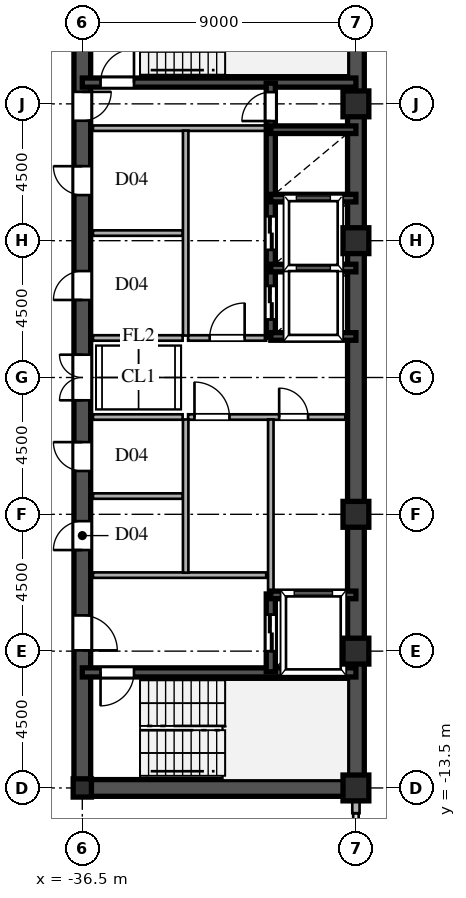
"""IFC4 building model, lengths in metres.
Left out: names, types, materials, properties, quantities, classifications, styles, units other than length and angle.
Written with IfcOpenShell. Run it as: python <this file> out.ifc"""

import sys

from ifc_helpers import new_model, si_unit, direction, frame, frame_2d, origin, origin_2d, place, context, subcontext, project, spatial, rectangle, hollow_rectangle, i_section, extrude, source, transform, mapped, element, fill, save


model = new_model("IFC4")
c1 = context("Model", 3, precision=1e-05, world=origin(), true_north=direction((0.0, 1.0)))
c2 = subcontext(c1, "Body", "Model", "MODEL_VIEW")
j1 = project(units=[si_unit("LENGTHUNIT", "METRE"), si_unit("PLANEANGLEUNIT", "RADIAN")], contexts=[c1])
p1 = place(None, origin())
s1 = spatial("IfcSite", under=j1, at=p1, CompositionType="ELEMENT")
p2 = place(p1, origin())
s2 = spatial("IfcBuilding", under=s1, at=p2, CompositionType="ELEMENT")
p3 = place(p2, frame((0.0, 0.0, 192.3)))
s3 = spatial("IfcBuildingStorey", under=s2, at=p3, CompositionType="ELEMENT", Elevation=192.3)
m1 = source(origin(), c2, "Body", "SweptSolid", [
    extrude(hollow_rectangle(XDim=0.85, YDim=0.85, WallThickness=0.036, at=origin_2d()), origin(), (0.0, 0.0, 1.0), 3.6),
])
for number, where, z_axis, x_axis in (
    (1, (-27.5, -13.5, 0.0), (0.0, 0.0, 1.0), (1.0, 0.0, 0.0)),
    (2, (-27.5, -9.0, 0.0), (0.0, 0.0, 1.0), (1.0, 0.0, 0.0)),
    (3, (-27.5, -4.5, 0.0), (0.0, 0.0, 1.0), (1.0, 0.0, 0.0)),
    (4, (-27.5, 4.5, 0.0), (0.0, 0.0, 1.0), (1.0, 0.0, 0.0)),
    (5, (-27.5, 9.0, 0.0), (0.0, 0.0, 1.0), (1.0, 0.0, 0.0)),
):
    element("IfcColumn", number, at=place(p3, frame(where, z_axis=z_axis, x_axis=x_axis)), inside=s3, PredefinedType="COLUMN", context=c2, shape_type="MappedRepresentation", body=[
        mapped(m1, transform((0.0, 0.0, 0.0), scale=1.0)),
    ])
m2 = source(origin(), c2, "Body", "SweptSolid", [
    extrude(i_section(OverallWidth=0.6, OverallDepth=0.6, WebThickness=0.025, FlangeThickness=0.04, at=origin_2d()), origin(), (0.0, 0.0, 1.0), 3.6),
])
p4 = place(p3, frame((-36.5, -13.5, 0.0), z_axis=(0.0, 0.0, 1.0), x_axis=(1.0, 0.0, 0.0)))
e6 = element("IfcColumn", 6, at=p4, inside=s3, PredefinedType="COLUMN", context=c2, shape_type="MappedRepresentation", body=[
    mapped(m2, transform((0.0, 0.0, 0.0), scale=1.0)),
])
p5 = place(p3, frame((-27.5, -14.33, 0.0), z_axis=(0.0, 0.0, 1.0), x_axis=(0.0, 1.0, 0.0)))
e7 = element("IfcWall", 7, at=p5, inside=s3, PredefinedType="SOLIDWALL", context=c2, shape_type="SweptSolid", body=[
    extrude(rectangle(XDim=0.55, YDim=0.24, at=frame_2d((0.275, 0.0))), origin(), (0.0, 0.0, 1.0), 1.88),
])
for number, where, z_axis, x_axis in (
    (8, (-27.5, -13.5, 0.0), (0.0, 0.0, 1.0), (0.0, 1.0, 0.0)),
    (9, (-27.5, 1.3, 0.0), (0.0, 0.0, 1.0), (0.0, 1.0, 0.0)),
):
    element("IfcWall", number, at=place(p3, frame(where, z_axis=z_axis, x_axis=x_axis)), inside=s3, PredefinedType="SHEAR", context=c2, shape_type="SweptSolid", body=[
        extrude(rectangle(XDim=12.2, YDim=0.55, at=frame_2d((6.1, 0.0))), origin(), (0.0, 0.0, 1.0), 3.38),
    ])
p6 = place(p3, frame((-27.5, -1.3, 0.0), z_axis=(0.0, 0.0, 1.0), x_axis=(0.0, 1.0, 0.0)))
e10 = element("IfcWall", 10, at=p6, inside=s3, PredefinedType="SHEAR", context=c2, shape_type="SweptSolid", body=[
    extrude(rectangle(XDim=2.6, YDim=0.55, at=frame_2d((1.3, 0.0))), origin(), (0.0, 0.0, 1.0), 3.38),
])
p7 = place(p3, frame((-36.5, -13.5, 0.0), z_axis=(0.0, 0.0, 1.0), x_axis=(1.0, 0.0, 0.0)))
e11 = element("IfcWall", 11, at=p7, inside=s3, PredefinedType="SHEAR", context=c2, shape_type="SweptSolid", body=[
    extrude(rectangle(XDim=9.0, YDim=0.55, at=frame_2d((4.5, 0.0))), origin(), (0.0, 0.0, 1.0), 3.38),
])
p8 = place(p3, frame((-36.5, -13.65, 0.0), z_axis=(0.0, 0.0, 1.0), x_axis=(0.0, 1.0, 0.0)))
e12 = element("IfcWall", 12, at=p8, inside=s3, PredefinedType="SHEAR", context=c2, shape_type="SweptSolid", body=[
    extrude(rectangle(XDim=7.15, YDim=0.55, at=frame_2d((3.575, 0.0))), origin(), (0.0, 0.0, 1.0), 3.38),
])
p9 = place(p8, frame((4.675, 0.0, 0.0)))
e13 = element("IfcOpeningElement", 13, at=p9, cuts=e12, PredefinedType="OPENING", context=c2, shape_type="SweptSolid", body=[
    extrude(rectangle(XDim=1.15, YDim=2.2, at=frame_2d((0.575, 1.1))), frame((0.0, 0.285, 0.0), z_axis=(0.0, -1.0, 0.0), x_axis=(1.0, 0.0, 0.0)), (0.0, 0.0, 1.0), 0.57),
])
p10 = place(p3, frame((-36.5, -1.3, 0.0), z_axis=(0.0, 0.0, 1.0), x_axis=(0.0, 1.0, 0.0)))
e14 = element("IfcWall", 14, at=p10, inside=s3, PredefinedType="SHEAR", context=c2, shape_type="SweptSolid", body=[
    extrude(rectangle(XDim=2.6, YDim=0.55, at=frame_2d((1.3, 0.0))), origin(), (0.0, 0.0, 1.0), 3.38),
])
p11 = place(p10, frame((0.55, 0.0, 0.0)))
e15 = element("IfcOpeningElement", 15, at=p11, cuts=e14, PredefinedType="OPENING", context=c2, shape_type="SweptSolid", body=[
    extrude(rectangle(XDim=1.5, YDim=2.3, at=frame_2d((0.75, 1.15))), frame((0.0, 0.285, 0.0), z_axis=(0.0, -1.0, 0.0), x_axis=(1.0, 0.0, 0.0)), (0.0, 0.0, 1.0), 0.57),
])
p12 = place(p3, frame((-36.5, 8.2, 0.0), z_axis=(0.0, 0.0, 1.0), x_axis=(0.0, 1.0, 0.0)))
e16 = element("IfcWall", 16, at=p12, inside=s3, PredefinedType="SHEAR", context=c2, shape_type="SweptSolid", body=[
    extrude(rectangle(XDim=5.45, YDim=0.55, at=frame_2d((2.725, 0.0))), origin(), (0.0, 0.0, 1.0), 3.38),
])
p13 = place(p12, frame((0.245, 0.0, 0.0)))
e17 = element("IfcOpeningElement", 17, at=p13, cuts=e16, PredefinedType="OPENING", context=c2, shape_type="SweptSolid", body=[
    extrude(rectangle(XDim=0.95, YDim=2.15, at=frame_2d((0.475, 1.075))), frame((0.0, 0.285, 0.0), z_axis=(0.0, -1.0, 0.0), x_axis=(1.0, 0.0, 0.0)), (0.0, 0.0, 1.0), 0.57),
])
p14 = place(p3, frame((-36.5, -6.5, 0.0), z_axis=(0.0, 0.0, 1.0), x_axis=(0.0, 1.0, 0.0)))
e18 = element("IfcWall", 18, at=p14, inside=s3, PredefinedType="SHEAR", context=c2, shape_type="SweptSolid", body=[
    extrude(rectangle(XDim=2.6, YDim=0.55, at=frame_2d((1.3, 0.0))), origin(), (0.0, 0.0, 1.0), 3.38),
])
p15 = place(p14, frame((0.825, 0.0, 0.0)))
e19 = element("IfcOpeningElement", 19, at=p15, cuts=e18, PredefinedType="OPENING", context=c2, shape_type="SweptSolid", body=[
    extrude(rectangle(XDim=0.95, YDim=2.15, at=frame_2d((0.475, 1.075))), frame((0.0, 0.285, 0.0), z_axis=(0.0, -1.0, 0.0), x_axis=(1.0, 0.0, 0.0)), (0.0, 0.0, 1.0), 0.57),
])
p16 = place(p3, frame((-36.5, -3.9, 0.0), z_axis=(0.0, 0.0, 1.0), x_axis=(0.0, 1.0, 0.0)))
e20 = element("IfcWall", 20, at=p16, inside=s3, PredefinedType="SHEAR", context=c2, shape_type="SweptSolid", body=[
    extrude(rectangle(XDim=2.6, YDim=0.55, at=frame_2d((1.3, 0.0))), origin(), (0.0, 0.0, 1.0), 3.38),
])
p17 = place(p16, frame((0.825, 0.0, 0.0)))
e21 = element("IfcOpeningElement", 21, at=p17, cuts=e20, PredefinedType="OPENING", context=c2, shape_type="SweptSolid", body=[
    extrude(rectangle(XDim=0.95, YDim=2.15, at=frame_2d((0.475, 1.075))), frame((0.0, 0.285, 0.0), z_axis=(0.0, -1.0, 0.0), x_axis=(1.0, 0.0, 0.0)), (0.0, 0.0, 1.0), 0.57),
])
p18 = place(p3, frame((-36.5, 1.3, 0.0), z_axis=(0.0, 0.0, 1.0), x_axis=(0.0, 1.0, 0.0)))
e22 = element("IfcWall", 22, at=p18, inside=s3, PredefinedType="SHEAR", context=c2, shape_type="SweptSolid", body=[
    extrude(rectangle(XDim=3.45, YDim=0.55, at=frame_2d((1.725, 0.0))), origin(), (0.0, 0.0, 1.0), 3.38),
])
p19 = place(p18, frame((1.25, 0.0, 0.0)))
e23 = element("IfcOpeningElement", 23, at=p19, cuts=e22, PredefinedType="OPENING", context=c2, shape_type="SweptSolid", body=[
    extrude(rectangle(XDim=0.95, YDim=2.15, at=frame_2d((0.475, 1.075))), frame((0.0, 0.285, 0.0), z_axis=(0.0, -1.0, 0.0), x_axis=(1.0, 0.0, 0.0)), (0.0, 0.0, 1.0), 0.57),
])
p20 = place(p3, frame((-36.5, 4.75, 0.0), z_axis=(0.0, 0.0, 1.0), x_axis=(0.0, 1.0, 0.0)))
e24 = element("IfcWall", 24, at=p20, inside=s3, PredefinedType="SHEAR", context=c2, shape_type="SweptSolid", body=[
    extrude(rectangle(XDim=3.45, YDim=0.55, at=frame_2d((1.725, 0.0))), origin(), (0.0, 0.0, 1.0), 3.38),
])
p21 = place(p20, frame((1.25, 0.0, 0.0)))
e25 = element("IfcOpeningElement", 25, at=p21, cuts=e24, PredefinedType="OPENING", context=c2, shape_type="SweptSolid", body=[
    extrude(rectangle(XDim=0.95, YDim=2.15, at=frame_2d((0.475, 1.075))), frame((0.0, 0.285, 0.0), z_axis=(0.0, -1.0, 0.0), x_axis=(1.0, 0.0, 0.0)), (0.0, 0.0, 1.0), 0.57),
])
p22 = place(p3, frame((-36.5, -9.7, 0.0), z_axis=(0.0, 0.0, 1.0), x_axis=(1.0, 0.0, 0.0)))
e26 = element("IfcWall", 26, at=p22, inside=s3, PredefinedType="SHEAR", context=c2, shape_type="SweptSolid", body=[
    extrude(rectangle(XDim=9.0, YDim=0.3, at=frame_2d((4.5, 0.0))), origin(), (0.0, 0.0, 1.0), 3.38),
])
p23 = place(p22, frame((0.6, 0.0, 0.0)))
e27 = element("IfcOpeningElement", 27, at=p23, cuts=e26, PredefinedType="OPENING", context=c2, shape_type="SweptSolid", body=[
    extrude(rectangle(XDim=1.1, YDim=2.2, at=frame_2d((0.55, 1.1))), frame((0.0, 0.16, 0.0), z_axis=(0.0, -1.0, 0.0), x_axis=(1.0, 0.0, 0.0)), (0.0, 0.0, 1.0), 0.32),
])
p24 = place(p3, frame((-36.5, 9.7, 0.0), z_axis=(0.0, 0.0, 1.0), x_axis=(1.0, 0.0, 0.0)))
e28 = element("IfcWall", 28, at=p24, inside=s3, PredefinedType="SHEAR", context=c2, shape_type="SweptSolid", body=[
    extrude(rectangle(XDim=9.0, YDim=0.3, at=frame_2d((4.5, 0.0))), origin(), (0.0, 0.0, 1.0), 3.38),
])
p25 = place(p24, frame((0.6, 0.0, 0.0)))
e29 = element("IfcOpeningElement", 29, at=p25, cuts=e28, PredefinedType="OPENING", context=c2, shape_type="SweptSolid", body=[
    extrude(rectangle(XDim=1.1, YDim=2.2, at=frame_2d((0.55, 1.1))), frame((0.0, 0.16, 0.0), z_axis=(0.0, -1.0, 0.0), x_axis=(1.0, 0.0, 0.0)), (0.0, 0.0, 1.0), 0.32),
])
for number, where, z_axis, x_axis in (
    (30, (-30.3, -7.15, 0.0), (0.0, 0.0, 1.0), (1.0, 0.0, 0.0)),
    (31, (-30.3, 1.35, 0.0), (0.0, 0.0, 1.0), (1.0, 0.0, 0.0)),
    (32, (-30.3, 3.6, 0.0), (0.0, 0.0, 1.0), (1.0, 0.0, 0.0)),
    (33, (-30.3, 5.9, 0.0), (0.0, 0.0, 1.0), (1.0, 0.0, 0.0)),
    (34, (-30.3, 8.15, 0.0), (0.0, 0.0, 1.0), (1.0, 0.0, 0.0)),
):
    element("IfcWall", number, at=place(p3, frame(where, z_axis=z_axis, x_axis=x_axis)), inside=s3, PredefinedType="SHEAR", context=c2, shape_type="SweptSolid", body=[
        extrude(rectangle(XDim=2.8, YDim=0.25, at=frame_2d((1.4, 0.0))), origin(), (0.0, 0.0, 1.0), 3.38),
    ])
p26 = place(p3, frame((-30.3, -9.68, 0.0), z_axis=(0.0, 0.0, 1.0), x_axis=(0.0, 1.0, 0.0)))
e35 = element("IfcWall", 35, at=p26, inside=s3, PredefinedType="SHEAR", context=c2, shape_type="SweptSolid", body=[
    extrude(rectangle(XDim=2.56, YDim=0.3, at=frame_2d((1.28, 0.0))), origin(), (0.0, 0.0, 1.0), 3.38),
])
p27 = place(p26, frame((0.68, 0.0, 0.0)))
e36 = element("IfcOpeningElement", 36, at=p27, cuts=e35, PredefinedType="OPENING", context=c2, shape_type="SweptSolid", body=[
    extrude(rectangle(XDim=1.2, YDim=2.25, at=frame_2d((0.6, 1.125))), frame((0.0, 0.16, 0.0), z_axis=(0.0, -1.0, 0.0), x_axis=(1.0, 0.0, 0.0)), (0.0, 0.0, 1.0), 0.32),
])
p28 = place(p3, frame((-30.3, 1.32, 0.0), z_axis=(0.0, 0.0, 1.0), x_axis=(0.0, 1.0, 0.0)))
e37 = element("IfcWall", 37, at=p28, inside=s3, PredefinedType="SHEAR", context=c2, shape_type="SweptSolid", body=[
    extrude(rectangle(XDim=2.28, YDim=0.3, at=frame_2d((1.14, 0.0))), origin(), (0.0, 0.0, 1.0), 3.38),
])
p29 = place(p28, frame((0.59, 0.0, 0.0)))
e38 = element("IfcOpeningElement", 38, at=p29, cuts=e37, PredefinedType="OPENING", context=c2, shape_type="SweptSolid", body=[
    extrude(rectangle(XDim=1.1, YDim=2.2, at=frame_2d((0.55, 1.1))), frame((0.0, 0.16, 0.0), z_axis=(0.0, -1.0, 0.0), x_axis=(1.0, 0.0, 0.0)), (0.0, 0.0, 1.0), 0.32),
])
p30 = place(p3, frame((-30.3, 3.6, 0.0), z_axis=(0.0, 0.0, 1.0), x_axis=(0.0, 1.0, 0.0)))
e39 = element("IfcWall", 39, at=p30, inside=s3, PredefinedType="SHEAR", context=c2, shape_type="SweptSolid", body=[
    extrude(rectangle(XDim=2.3, YDim=0.3, at=frame_2d((1.15, 0.0))), origin(), (0.0, 0.0, 1.0), 3.38),
])
p31 = place(p30, frame((0.6, 0.0, 0.0)))
e40 = element("IfcOpeningElement", 40, at=p31, cuts=e39, PredefinedType="OPENING", context=c2, shape_type="SweptSolid", body=[
    extrude(rectangle(XDim=1.1, YDim=2.2, at=frame_2d((0.55, 1.1))), frame((0.0, 0.16, 0.0), z_axis=(0.0, -1.0, 0.0), x_axis=(1.0, 0.0, 0.0)), (0.0, 0.0, 1.0), 0.32),
])
p32 = place(p3, frame((-30.3, 5.9, 0.0), z_axis=(0.0, 0.0, 1.0), x_axis=(0.0, 1.0, 0.0)))
e41 = element("IfcWall", 41, at=p32, inside=s3, PredefinedType="SHEAR", context=c2, shape_type="SweptSolid", body=[
    extrude(rectangle(XDim=2.25, YDim=0.3, at=frame_2d((1.125, 0.0))), origin(), (0.0, 0.0, 1.0), 3.38),
])
p33 = place(p3, frame((-30.3, 8.15, 0.0), z_axis=(0.0, 0.0, 1.0), x_axis=(0.0, 1.0, 0.0)))
e42 = element("IfcWall", 42, at=p33, inside=s3, PredefinedType="SHEAR", context=c2, shape_type="SweptSolid", body=[
    extrude(rectangle(XDim=1.53, YDim=0.3, at=frame_2d((0.765, 0.0))), origin(), (0.0, 0.0, 1.0), 3.38),
])
p34 = place(p33, frame((0.285, 0.0, 0.0)))
e43 = element("IfcOpeningElement", 43, at=p34, cuts=e42, PredefinedType="OPENING", context=c2, shape_type="SweptSolid", body=[
    extrude(rectangle(XDim=0.95, YDim=2.15, at=frame_2d((0.475, 1.075))), frame((0.0, 0.16, 0.0), z_axis=(0.0, -1.0, 0.0), x_axis=(1.0, 0.0, 0.0)), (0.0, 0.0, 1.0), 0.32),
])
for number, where, z_axis, x_axis in (
    (44, (-36.15, -6.5, 0.0), (0.0, 0.0, 1.0), (1.0, 0.0, 0.0)),
    (45, (-36.15, 8.2, 0.0), (0.0, 0.0, 1.0), (1.0, 0.0, 0.0)),
):
    element("IfcWall", number, at=place(p3, frame(where, z_axis=z_axis, x_axis=x_axis)), inside=s3, PredefinedType="PARTITIONING", context=c2, shape_type="SweptSolid", body=[
        extrude(rectangle(XDim=5.7, YDim=0.18, at=frame_2d((2.85, 0.0))), origin(), (0.0, 0.0, 1.0), 3.38),
    ])
p35 = place(p3, frame((-33.1, -6.42, 0.0), z_axis=(0.0, 0.0, 1.0), x_axis=(0.0, 1.0, 0.0)))
e46 = element("IfcWall", 46, at=p35, inside=s3, PredefinedType="PARTITIONING", context=c2, shape_type="SweptSolid", body=[
    extrude(rectangle(XDim=5.04, YDim=0.18, at=frame_2d((2.52, 0.0))), origin(), (0.0, 0.0, 1.0), 3.38),
])
p36 = place(p3, frame((-33.1, 1.38, 0.0), z_axis=(0.0, 0.0, 1.0), x_axis=(0.0, 1.0, 0.0)))
e47 = element("IfcWall", 47, at=p36, inside=s3, PredefinedType="PARTITIONING", context=c2, shape_type="SweptSolid", body=[
    extrude(rectangle(XDim=6.74, YDim=0.18, at=frame_2d((3.37, 0.0))), origin(), (0.0, 0.0, 1.0), 3.38),
])
p37 = place(p3, frame((-30.3, -1.3, 0.0), z_axis=(0.0, 0.0, 1.0), x_axis=(1.0, 0.0, 0.0)))
e48 = element("IfcWall", 48, at=p37, inside=s3, PredefinedType="PARTITIONING", context=c2, shape_type="SweptSolid", body=[
    extrude(rectangle(XDim=2.45, YDim=0.18, at=frame_2d((1.225, 0.0))), origin(), (0.0, 0.0, 1.0), 3.38),
])
p38 = place(p37, frame((0.275, 0.0, 0.0)))
e49 = element("IfcOpeningElement", 49, at=p38, cuts=e48, PredefinedType="OPENING", context=c2, shape_type="SweptSolid", body=[
    extrude(rectangle(XDim=0.95, YDim=2.15, at=frame_2d((0.475, 1.075))), frame((0.0, 0.1, 0.0), z_axis=(0.0, -1.0, 0.0), x_axis=(1.0, 0.0, 0.0)), (0.0, 0.0, 1.0), 0.2),
])
p39 = place(p3, frame((-33.02, -1.3, 0.0), z_axis=(0.0, 0.0, 1.0), x_axis=(1.0, 0.0, 0.0)))
e50 = element("IfcWall", 50, at=p39, inside=s3, PredefinedType="PARTITIONING", context=c2, shape_type="SweptSolid", body=[
    extrude(rectangle(XDim=2.72, YDim=0.18, at=frame_2d((1.36, 0.0))), origin(), (0.0, 0.0, 1.0), 3.38),
])
p40 = place(p39, frame((0.21, 0.0, 0.0)))
e51 = element("IfcOpeningElement", 51, at=p40, cuts=e50, PredefinedType="OPENING", context=c2, shape_type="SweptSolid", body=[
    extrude(rectangle(XDim=1.15, YDim=2.2, at=frame_2d((0.575, 1.1))), frame((0.0, 0.1, 0.0), z_axis=(0.0, -1.0, 0.0), x_axis=(1.0, 0.0, 0.0)), (0.0, 0.0, 1.0), 0.2),
])
p41 = place(p3, frame((-30.3, -7.12, 0.0), z_axis=(0.0, 0.0, 1.0), x_axis=(0.0, 1.0, 0.0)))
e52 = element("IfcWall", 52, at=p41, inside=s3, PredefinedType="PARTITIONING", context=c2, shape_type="SweptSolid", body=[
    extrude(rectangle(XDim=5.74, YDim=0.18, at=frame_2d((2.87, 0.0))), origin(), (0.0, 0.0, 1.0), 3.38),
])
p42 = place(p3, frame((-33.02, 1.3, 0.0), z_axis=(0.0, 0.0, 1.0), x_axis=(1.0, 0.0, 0.0)))
e53 = element("IfcWall", 53, at=p42, inside=s3, PredefinedType="PARTITIONING", context=c2, shape_type="SweptSolid", body=[
    extrude(rectangle(XDim=2.57, YDim=0.18, at=frame_2d((1.285, 0.0))), origin(), (0.0, 0.0, 1.0), 3.38),
])
p43 = place(p42, frame((0.71, 0.0, 0.0)))
e54 = element("IfcOpeningElement", 54, at=p43, cuts=e53, PredefinedType="OPENING", context=c2, shape_type="SweptSolid", body=[
    extrude(rectangle(XDim=1.15, YDim=2.2, at=frame_2d((0.575, 1.1))), frame((0.0, 0.1, 0.0), z_axis=(0.0, -1.0, 0.0), x_axis=(1.0, 0.0, 0.0)), (0.0, 0.0, 1.0), 0.2),
])
for number, where, z_axis, x_axis in (
    (55, (-36.15, -1.3, 0.0), (0.0, 0.0, 1.0), (1.0, 0.0, 0.0)),
    (56, (-36.15, 1.3, 0.0), (0.0, 0.0, 1.0), (1.0, 0.0, 0.0)),
    (57, (-36.15, -3.9, 0.0), (0.0, 0.0, 1.0), (1.0, 0.0, 0.0)),
    (58, (-36.15, 4.75, 0.0), (0.0, 0.0, 1.0), (1.0, 0.0, 0.0)),
):
    element("IfcWall", number, at=place(p3, frame(where, z_axis=z_axis, x_axis=x_axis)), inside=s3, PredefinedType="PARTITIONING", context=c2, shape_type="SweptSolid", body=[
        extrude(rectangle(XDim=2.95, YDim=0.18, at=frame_2d((1.475, 0.0))), origin(), (0.0, 0.0, 1.0), 3.38),
    ])
m3 = source(origin(), c2, "Body", "SweptSolid", [
    extrude(rectangle(XDim=1.15, YDim=2.2, at=frame_2d((0.575, 1.1))), frame((0.0, 0.025, 0.0), z_axis=(0.0, -1.0, 0.0), x_axis=(1.0, 0.0, 0.0)), (0.0, 0.0, 1.0), 0.05),
])
p44 = place(p9, frame((1.15, 0.0, 0.0), z_axis=(0.0, 0.0, 1.0), x_axis=(-1.0, 0.0, 0.0)))
e59 = element("IfcDoor", 59, at=p44, inside=s3, OperationType="SINGLE_SWING_LEFT", PredefinedType="DOOR", context=c2, shape_type="MappedRepresentation", body=[
    mapped(m3, transform((0.0, 0.0, 0.0), scale=1.0)),
])
fill(e13, e59)
m4 = source(origin(), c2, "Body", "SweptSolid", [
    extrude(rectangle(XDim=1.5, YDim=2.3, at=frame_2d((0.75, 1.15))), frame((0.0, 0.025, 0.0), z_axis=(0.0, -1.0, 0.0), x_axis=(1.0, 0.0, 0.0)), (0.0, 0.0, 1.0), 0.05),
])
p45 = place(p11, origin())
e60 = element("IfcDoor", 60, at=p45, inside=s3, OperationType="DOUBLE_SWING_LEFT", PredefinedType="DOOR", context=c2, shape_type="MappedRepresentation", body=[
    mapped(m4, transform((0.0, 0.0, 0.0), scale=1.0)),
])
fill(e15, e60)
m5 = source(origin(), c2, "Body", "SweptSolid", [
    extrude(rectangle(XDim=0.95, YDim=2.15, at=frame_2d((0.475, 1.075))), frame((0.0, 0.025, 0.0), z_axis=(0.0, -1.0, 0.0), x_axis=(1.0, 0.0, 0.0)), (0.0, 0.0, 1.0), 0.05),
])
p46 = place(p13, frame((0.95, 0.0, 0.0), z_axis=(0.0, 0.0, 1.0), x_axis=(-1.0, 0.0, 0.0)))
e61 = element("IfcDoor", 61, at=p46, inside=s3, OperationType="SINGLE_SWING_RIGHT", PredefinedType="DOOR", context=c2, shape_type="MappedRepresentation", body=[
    mapped(m5, transform((0.0, 0.0, 0.0), scale=1.0)),
])
fill(e17, e61)
p47 = place(p15, origin())
e62 = element("IfcDoor", 62, at=p47, inside=s3, OperationType="SINGLE_SWING_LEFT", PredefinedType="DOOR", context=c2, shape_type="MappedRepresentation", body=[
    mapped(m5, transform((0.0, 0.0, 0.0), scale=1.0)),
])
fill(e19, e62)
p48 = place(p17, origin())
e63 = element("IfcDoor", 63, at=p48, inside=s3, OperationType="SINGLE_SWING_RIGHT", PredefinedType="DOOR", context=c2, shape_type="MappedRepresentation", body=[
    mapped(m5, transform((0.0, 0.0, 0.0), scale=1.0)),
])
fill(e21, e63)
p49 = place(p19, origin())
e64 = element("IfcDoor", 64, at=p49, inside=s3, OperationType="SINGLE_SWING_LEFT", PredefinedType="DOOR", context=c2, shape_type="MappedRepresentation", body=[
    mapped(m5, transform((0.0, 0.0, 0.0), scale=1.0)),
])
fill(e23, e64)
p50 = place(p21, origin())
e65 = element("IfcDoor", 65, at=p50, inside=s3, OperationType="SINGLE_SWING_RIGHT", PredefinedType="DOOR", context=c2, shape_type="MappedRepresentation", body=[
    mapped(m5, transform((0.0, 0.0, 0.0), scale=1.0)),
])
fill(e25, e65)
m6 = source(origin(), c2, "Body", "SweptSolid", [
    extrude(rectangle(XDim=1.1, YDim=2.2, at=frame_2d((0.55, 1.1))), frame((0.0, 0.025, 0.0), z_axis=(0.0, -1.0, 0.0), x_axis=(1.0, 0.0, 0.0)), (0.0, 0.0, 1.0), 0.05),
])
p51 = place(p23, frame((1.1, 0.0, 0.0), z_axis=(0.0, 0.0, 1.0), x_axis=(-1.0, 0.0, 0.0)))
e66 = element("IfcDoor", 66, at=p51, inside=s3, OperationType="SINGLE_SWING_LEFT", PredefinedType="DOOR", context=c2, shape_type="MappedRepresentation", body=[
    mapped(m6, transform((0.0, 0.0, 0.0), scale=1.0)),
])
fill(e27, e66)
p52 = place(p25, origin())
e67 = element("IfcDoor", 67, at=p52, inside=s3, OperationType="SINGLE_SWING_RIGHT", PredefinedType="DOOR", context=c2, shape_type="MappedRepresentation", body=[
    mapped(m6, transform((0.0, 0.0, 0.0), scale=1.0)),
])
fill(e29, e67)
m7 = source(origin(), c2, "Body", "SweptSolid", [
    extrude(rectangle(XDim=1.2, YDim=2.25, at=frame_2d((0.6, 1.125))), frame((0.0, 0.025, 0.0), z_axis=(0.0, -1.0, 0.0), x_axis=(1.0, 0.0, 0.0)), (0.0, 0.0, 1.0), 0.05),
])
p53 = place(p27, origin())
e68 = element("IfcDoor", 68, at=p53, inside=s3, OperationType="DOUBLE_DOOR_SLIDING", PredefinedType="DOOR", context=c2, shape_type="MappedRepresentation", body=[
    mapped(m7, transform((0.0, 0.0, 0.0), scale=1.0)),
])
fill(e36, e68)
m8 = source(origin(), c2, "Body", "SweptSolid", [
    extrude(rectangle(XDim=1.1, YDim=2.2, at=frame_2d((0.55, 1.1))), frame((0.0, 0.025, 0.0), z_axis=(0.0, -1.0, 0.0), x_axis=(1.0, 0.0, 0.0)), (0.0, 0.0, 1.0), 0.05),
])
p54 = place(p29, origin())
e69 = element("IfcDoor", 69, at=p54, inside=s3, OperationType="DOUBLE_DOOR_SLIDING", PredefinedType="DOOR", context=c2, shape_type="MappedRepresentation", body=[
    mapped(m8, transform((0.0, 0.0, 0.0), scale=1.0)),
])
fill(e38, e69)
p55 = place(p31, origin())
e70 = element("IfcDoor", 70, at=p55, inside=s3, OperationType="DOUBLE_DOOR_SLIDING", PredefinedType="DOOR", context=c2, shape_type="MappedRepresentation", body=[
    mapped(m8, transform((0.0, 0.0, 0.0), scale=1.0)),
])
fill(e40, e70)
p56 = place(p34, origin())
e71 = element("IfcDoor", 71, at=p56, inside=s3, OperationType="SINGLE_SWING_LEFT", PredefinedType="DOOR", context=c2, shape_type="MappedRepresentation", body=[
    mapped(m5, transform((0.0, 0.0, 0.0), scale=1.0)),
])
fill(e43, e71)
p57 = place(p38, origin())
e72 = element("IfcDoor", 72, at=p57, inside=s3, OperationType="SINGLE_SWING_LEFT", PredefinedType="DOOR", context=c2, shape_type="MappedRepresentation", body=[
    mapped(m5, transform((0.0, 0.0, 0.0), scale=1.0)),
])
fill(e49, e72)
p58 = place(p40, origin())
e73 = element("IfcDoor", 73, at=p58, inside=s3, OperationType="SINGLE_SWING_LEFT", PredefinedType="DOOR", context=c2, shape_type="MappedRepresentation", body=[
    mapped(m3, transform((0.0, 0.0, 0.0), scale=1.0)),
])
fill(e51, e73)
p59 = place(p43, origin())
e74 = element("IfcDoor", 74, at=p59, inside=s3, OperationType="SINGLE_SWING_RIGHT", PredefinedType="DOOR", context=c2, shape_type="MappedRepresentation", body=[
    mapped(m3, transform((0.0, 0.0, 0.0), scale=1.0)),
])
fill(e54, e74)
save(model, sys.argv[1])
